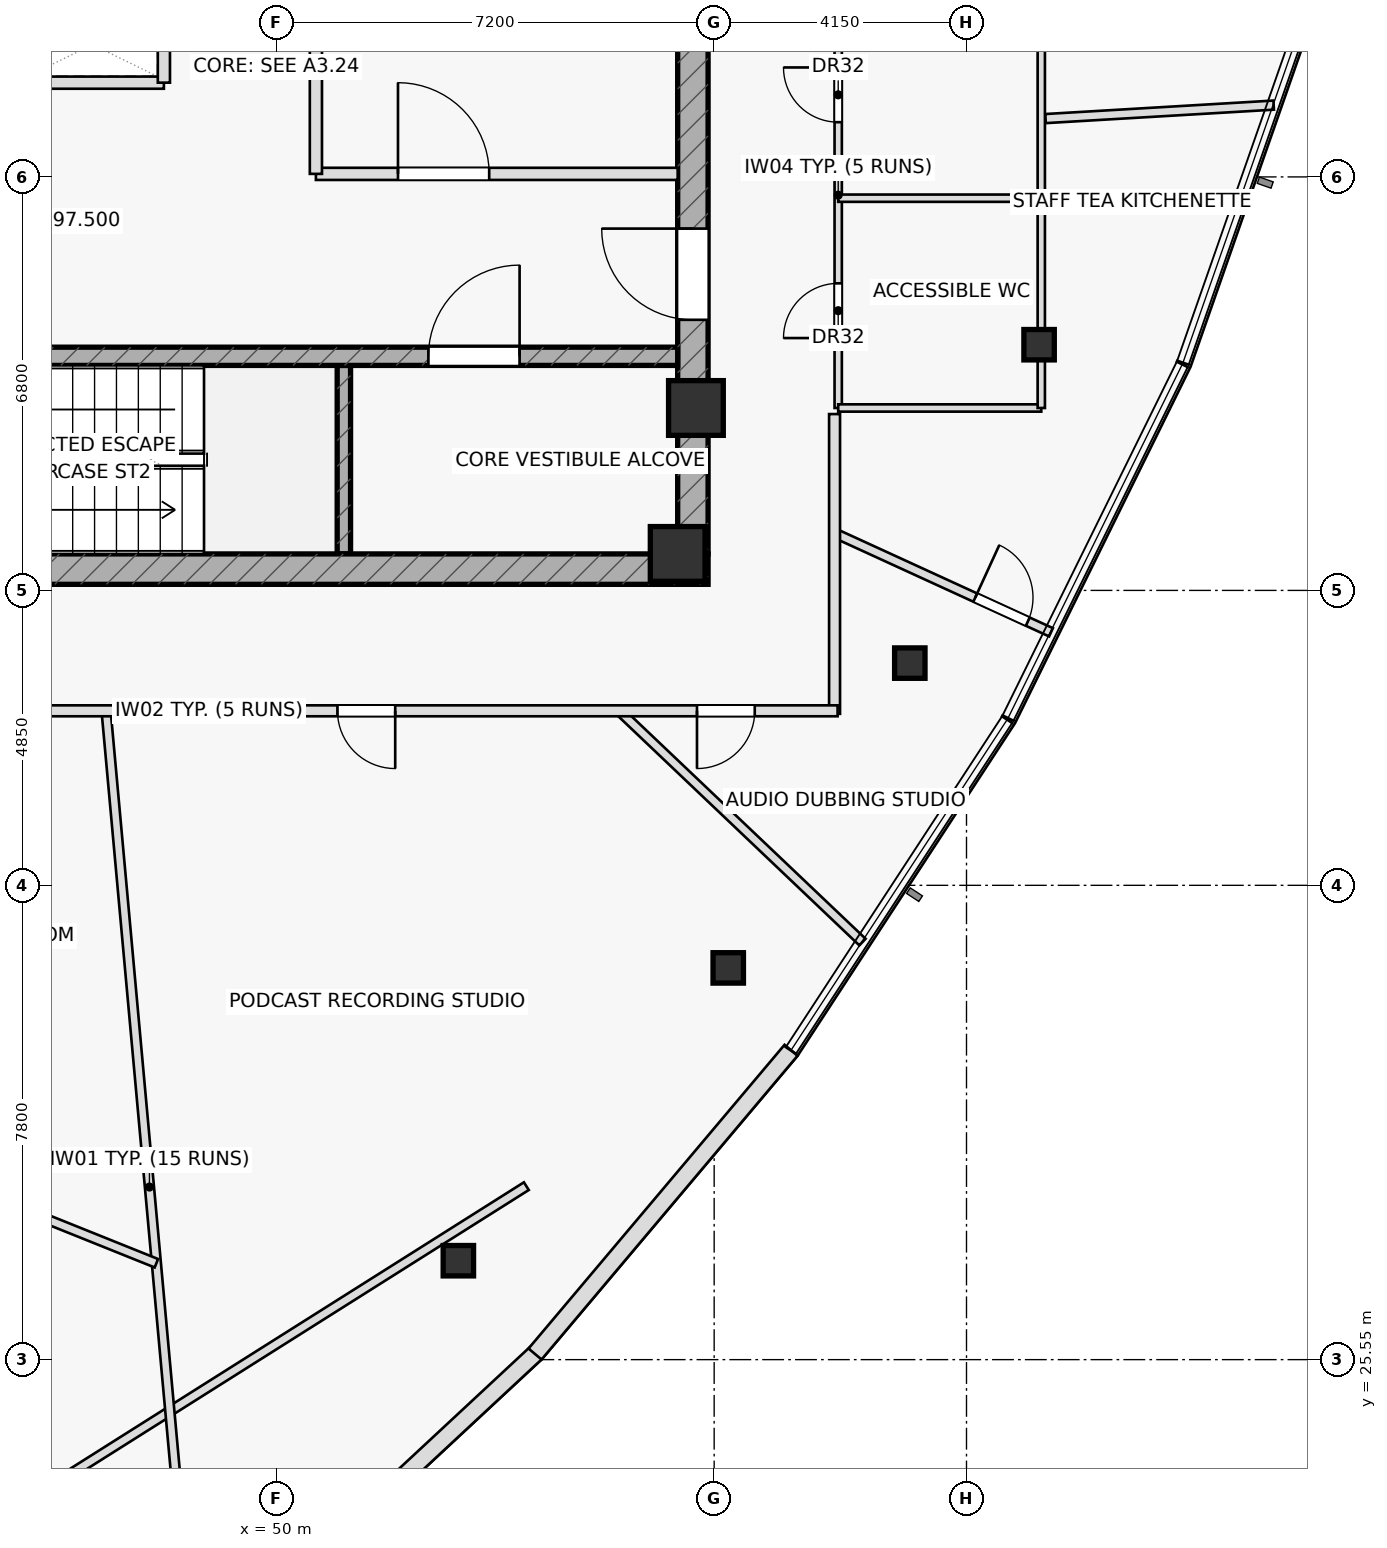
"""IFC4 building model, lengths in metres.
Left out: names, types, materials, properties, quantities, classifications, styles, units other than length and angle.
Written with IfcOpenShell. Run it as: python <this file> out.ifc"""

import sys

from ifc_helpers import new_model, si_unit, direction, frame, frame_2d, origin, origin_2d, place, context, subcontext, project, spatial, rectangle, hollow_rectangle, extrude, element, fill, save


model = new_model("IFC4")
c1 = context("Model", 3, precision=1e-05, world=origin(), true_north=direction((0.0, 1.0)))
c2 = subcontext(c1, "Body", "Model", "MODEL_VIEW")
j1 = project(units=[si_unit("LENGTHUNIT", "METRE"), si_unit("PLANEANGLEUNIT", "RADIAN")], contexts=[c1])
p1 = place(None, origin())
s1 = spatial("IfcSite", under=j1, at=p1, CompositionType="ELEMENT")
p2 = place(p1, origin())
s2 = spatial("IfcBuilding", under=s1, at=p2, CompositionType="ELEMENT")
p3 = place(p2, frame((0.0, 0.0, 297.5)))
s3 = spatial("IfcBuildingStorey", under=s2, at=p3, CompositionType="ELEMENT", Elevation=297.5)
p4 = place(p3, frame((51.11, 38.8, 0.0), z_axis=(0.0, 0.0, 1.0), x_axis=(0.0, 1.0, 0.0)))
e1 = element("IfcWall", 1, at=p4, inside=s3, PredefinedType="SHEAR", context=c2, shape_type="SweptSolid", body=[
    extrude(rectangle(XDim=3.1, YDim=0.22, at=frame_2d((1.55, 0.0))), origin(), (0.0, 0.0, 1.0), 3.7),
])
p5 = place(p3, frame((42.9, 38.55, 0.0), z_axis=(0.0, 0.0, 1.0), x_axis=(1.0, 0.0, 0.0)))
e2 = element("IfcWall", 2, at=p5, inside=s3, PredefinedType="SHEAR", context=c2, shape_type="SweptSolid", body=[
    extrude(rectangle(XDim=14.2, YDim=0.5, at=frame_2d((7.1, 0.0))), origin(), (0.0, 0.0, 1.0), 3.7),
])
p6 = place(p5, frame((0.78, 0.0, 0.0)))
e3 = element("IfcOpeningElement", 3, at=p6, cuts=e2, PredefinedType="OPENING", context=c2, shape_type="SweptSolid", body=[
    extrude(rectangle(XDim=1.05, YDim=2.2, at=frame_2d((0.525, 1.1))), frame((0.0, 0.26, 0.0), z_axis=(0.0, -1.0, 0.0), x_axis=(1.0, 0.0, 0.0)), (0.0, 0.0, 1.0), 0.52),
])
p7 = place(p3, frame((56.85, 38.8, 0.0), z_axis=(0.0, 0.0, 1.0), x_axis=(0.0, 1.0, 0.0)))
e4 = element("IfcWall", 4, at=p7, inside=s3, PredefinedType="SHEAR", context=c2, shape_type="SweptSolid", body=[
    extrude(rectangle(XDim=12.4, YDim=0.5, at=frame_2d((6.2, 0.0))), origin(), (0.0, 0.0, 1.0), 3.7),
])
p8 = place(p7, frame((3.85, 0.0, 0.0)))
e5 = element("IfcOpeningElement", 5, at=p8, cuts=e4, PredefinedType="OPENING", context=c2, shape_type="SweptSolid", body=[
    extrude(rectangle(XDim=1.5, YDim=2.2, at=frame_2d((0.75, 1.1))), frame((0.0, 0.26, 0.0), z_axis=(0.0, -1.0, 0.0), x_axis=(1.0, 0.0, 0.0)), (0.0, 0.0, 1.0), 0.52),
])
p9 = place(p3, frame((43.4, 42.05, 0.0), z_axis=(0.0, 0.0, 1.0), x_axis=(1.0, 0.0, 0.0)))
e6 = element("IfcWall", 6, at=p9, inside=s3, PredefinedType="SHEAR", context=c2, shape_type="SweptSolid", body=[
    extrude(rectangle(XDim=13.2, YDim=0.3, at=frame_2d((6.6, 0.0))), origin(), (0.0, 0.0, 1.0), 3.7),
])
p10 = place(p9, frame((9.1, 0.0, 0.0)))
e7 = element("IfcOpeningElement", 7, at=p10, cuts=e6, PredefinedType="OPENING", context=c2, shape_type="SweptSolid", body=[
    extrude(rectangle(XDim=1.5, YDim=2.2, at=frame_2d((0.75, 1.1))), frame((0.0, 0.16, 0.0), z_axis=(0.0, -1.0, 0.0), x_axis=(1.0, 0.0, 0.0)), (0.0, 0.0, 1.0), 0.32),
])
for number, where, z_axis, x_axis in (
    (8, (56.9, 41.2, 0.0), (0.0, 0.0, 1.0), (1.0, 0.0, 0.0)),
    (9, (56.6, 38.8, 0.0), (0.0, 0.0, 1.0), (1.0, 0.0, 0.0)),
):
    element("IfcColumn", number, at=place(p3, frame(where, z_axis=z_axis, x_axis=x_axis)), inside=s3, PredefinedType="COLUMN", context=c2, shape_type="SweptSolid", body=[
        extrude(rectangle(XDim=0.9, YDim=0.9, at=origin_2d()), origin(), (0.0, 0.0, 1.0), 3.7),
    ])
for number, where, z_axis, x_axis in (
    (10, (52.993, 27.177, 0.0), (0.0, 0.0, 1.0), (1.0, 0.0, 0.0)),
    (11, (57.431, 31.992, 0.0), (0.0, 0.0, 1.0), (1.0, 0.0, 0.0)),
    (12, (60.417, 37.004, 0.0), (0.0, 0.0, 1.0), (1.0, 0.0, 0.0)),
    (13, (62.544, 42.24, 0.0), (0.0, 0.0, 1.0), (1.0, 0.0, 0.0)),
):
    element("IfcColumn", number, at=place(p3, frame(where, z_axis=z_axis, x_axis=x_axis)), inside=s3, PredefinedType="COLUMN", context=c2, shape_type="SweptSolid", body=[
        extrude(hollow_rectangle(XDim=0.5, YDim=0.5, WallThickness=0.03, at=origin_2d()), origin(), (0.0, 0.0, 1.0), 3.7),
    ])
p11 = place(p3, frame((45.75, 46.55, 0.0), z_axis=(0.0, 0.0, 1.0), x_axis=(1.0, 0.0, 0.0)))
e14 = element("IfcWall", 14, at=p11, inside=s3, PredefinedType="PARTITIONING", context=c2, shape_type="SweptSolid", body=[
    extrude(rectangle(XDim=2.4, YDim=0.2, at=frame_2d((1.2, 0.0))), origin(), (0.0, 0.0, 1.0), 3.7),
])
p12 = place(p3, frame((48.15, 46.55, 0.0), z_axis=(0.0, 0.0, 1.0), x_axis=(0.0, 1.0, 0.0)))
e15 = element("IfcWall", 15, at=p12, inside=s3, PredefinedType="PARTITIONING", context=c2, shape_type="SweptSolid", body=[
    extrude(rectangle(XDim=1.25, YDim=0.2, at=frame_2d((0.625, 0.0))), origin(), (0.0, 0.0, 1.0), 3.7),
])
p13 = place(p3, frame((50.65, 45.05, 0.0), z_axis=(0.0, 0.0, 1.0), x_axis=(1.0, 0.0, 0.0)))
e16 = element("IfcWall", 16, at=p13, inside=s3, PredefinedType="PARTITIONING", context=c2, shape_type="SweptSolid", body=[
    extrude(rectangle(XDim=5.95, YDim=0.2, at=frame_2d((2.975, 0.0))), origin(), (0.0, 0.0, 1.0), 3.7),
])
p14 = place(p13, frame((1.35, 0.0, 0.0)))
e17 = element("IfcOpeningElement", 17, at=p14, cuts=e16, PredefinedType="OPENING", context=c2, shape_type="SweptSolid", body=[
    extrude(rectangle(XDim=1.5, YDim=2.2, at=frame_2d((0.75, 1.1))), frame((0.0, 0.11, 0.0), z_axis=(0.0, -1.0, 0.0), x_axis=(1.0, 0.0, 0.0)), (0.0, 0.0, 1.0), 0.22),
])
p15 = place(p3, frame((50.65, 45.05, 0.0), z_axis=(0.0, 0.0, 1.0), x_axis=(0.0, 1.0, 0.0)))
e18 = element("IfcWall", 18, at=p15, inside=s3, PredefinedType="PARTITIONING", context=c2, shape_type="SweptSolid", body=[
    extrude(rectangle(XDim=2.75, YDim=0.2, at=frame_2d((1.375, 0.0))), origin(), (0.0, 0.0, 1.0), 3.7),
])
p16 = place(p3, frame((44.927, 22.605, 0.0), z_axis=(0.0, 0.0, 1.0), x_axis=(0.845624548895, 0.533778158326, 0.0)))
e19 = element("IfcWall", 19, at=p16, inside=s3, PredefinedType="PARTITIONING", context=c2, shape_type="SweptSolid", body=[
    extrude(rectangle(XDim=10.861, YDim=0.15, at=frame_2d((5.431, 0.0))), origin(), (0.0, 0.0, 1.0), 3.175),
])
p17 = place(p3, frame((59.24, 41.2, 0.0), z_axis=(0.0, 0.0, 1.0), x_axis=(0.0, 1.0, 0.0)))
e20 = element("IfcWall", 20, at=p17, inside=s3, PredefinedType="PARTITIONING", context=c2, shape_type="SweptSolid", body=[
    extrude(rectangle(XDim=7.0, YDim=0.12, at=frame_2d((3.5, 0.0))), origin(), (0.0, 0.0, 1.0), 3.7),
])
p18 = place(p17, frame((1.15, 0.0, 0.0)))
e21 = element("IfcOpeningElement", 21, at=p18, cuts=e20, PredefinedType="OPENING", context=c2, shape_type="SweptSolid", body=[
    extrude(rectangle(XDim=0.9, YDim=2.05, at=frame_2d((0.45, 1.025))), frame((0.0, 0.07, 0.0), z_axis=(0.0, -1.0, 0.0), x_axis=(1.0, 0.0, 0.0)), (0.0, 0.0, 1.0), 0.14),
])
p19 = place(p17, frame((4.7, 0.0, 0.0)))
e22 = element("IfcOpeningElement", 22, at=p19, cuts=e20, PredefinedType="OPENING", context=c2, shape_type="SweptSolid", body=[
    extrude(rectangle(XDim=0.9, YDim=2.05, at=frame_2d((0.45, 1.025))), frame((0.0, 0.07, 0.0), z_axis=(0.0, -1.0, 0.0), x_axis=(1.0, 0.0, 0.0)), (0.0, 0.0, 1.0), 0.14),
])
p20 = place(p3, frame((59.24, 41.2, 0.0), z_axis=(0.0, 0.0, 1.0), x_axis=(1.0, 0.0, 0.0)))
e23 = element("IfcWall", 23, at=p20, inside=s3, PredefinedType="PARTITIONING", context=c2, shape_type="SweptSolid", body=[
    extrude(rectangle(XDim=3.34, YDim=0.12, at=frame_2d((1.67, 0.0))), origin(), (0.0, 0.0, 1.0), 3.175),
])
p21 = place(p3, frame((59.24, 44.65, 0.0), z_axis=(0.0, 0.0, 1.0), x_axis=(1.0, 0.0, 0.0)))
e24 = element("IfcWall", 24, at=p21, inside=s3, PredefinedType="PARTITIONING", context=c2, shape_type="SweptSolid", body=[
    extrude(rectangle(XDim=3.34, YDim=0.12, at=frame_2d((1.67, 0.0))), origin(), (0.0, 0.0, 1.0), 3.7),
])
p22 = place(p3, frame((62.58, 41.2, 0.0), z_axis=(0.0, 0.0, 1.0), x_axis=(0.0, 1.0, 0.0)))
e25 = element("IfcWall", 25, at=p22, inside=s3, PredefinedType="PARTITIONING", context=c2, shape_type="SweptSolid", body=[
    extrude(rectangle(XDim=7.0, YDim=0.12, at=frame_2d((3.5, 0.0))), origin(), (0.0, 0.0, 1.0), 3.235),
])
p23 = place(p3, frame((47.199, 36.22, 0.0), z_axis=(0.0, 0.0, 1.0), x_axis=(0.090664502259, -0.995881492965, 0.0)))
e26 = element("IfcWall", 26, at=p23, inside=s3, PredefinedType="PARTITIONING", context=c2, shape_type="SweptSolid", body=[
    extrude(rectangle(XDim=15.729, YDim=0.15, at=frame_2d((7.864, 0.0))), origin(), (0.0, 0.0, 1.0), 3.235),
])
p24 = place(p3, frame((55.638, 36.22, 0.0), z_axis=(0.0, 0.0, 1.0), x_axis=(0.724833790001, -0.688923781613, 0.0)))
e27 = element("IfcWall", 27, at=p24, inside=s3, PredefinedType="PARTITIONING", context=c2, shape_type="SweptSolid", body=[
    extrude(rectangle(XDim=5.521, YDim=0.15, at=frame_2d((2.76, 0.0))), origin(), (0.0, 0.0, 1.0), 3.175),
])
p25 = place(p3, frame((59.18, 39.143, 0.0), z_axis=(0.0, 0.0, 1.0), x_axis=(0.909076630741, -0.416628946955, 0.0)))
e28 = element("IfcWall", 28, at=p25, inside=s3, PredefinedType="PARTITIONING", context=c2, shape_type="SweptSolid", body=[
    extrude(rectangle(XDim=3.916, YDim=0.15, at=frame_2d((1.958, 0.0))), origin(), (0.0, 0.0, 1.0), 3.235),
])
p26 = place(p25, frame((2.545, 0.0, 0.0)))
e29 = element("IfcOpeningElement", 29, at=p26, cuts=e28, PredefinedType="OPENING", context=c2, shape_type="SweptSolid", body=[
    extrude(rectangle(XDim=0.95, YDim=2.05, at=frame_2d((0.475, 1.025))), frame((0.0, 0.085, 0.0), z_axis=(0.0, -1.0, 0.0), x_axis=(1.0, 0.0, 0.0)), (0.0, 0.0, 1.0), 0.17),
])
p27 = place(p3, frame((62.65, 45.959, 0.0), z_axis=(0.0, 0.0, 1.0), x_axis=(0.998263156223, 0.058912400462, 0.0)))
e30 = element("IfcWall", 30, at=p27, inside=s3, PredefinedType="PARTITIONING", context=c2, shape_type="SweptSolid", body=[
    extrude(rectangle(XDim=3.759, YDim=0.15, at=frame_2d((1.879, 0.0))), origin(), (0.0, 0.0, 1.0), 3.235),
])
p28 = place(p3, frame((36.877, 31.613, 0.0), z_axis=(0.0, 0.0, 1.0), x_axis=(0.92795166299, -0.372700565003, 0.0)))
e31 = element("IfcWall", 31, at=p28, inside=s3, PredefinedType="PARTITIONING", context=c2, shape_type="SweptSolid", body=[
    extrude(rectangle(XDim=12.015, YDim=0.15, at=frame_2d((6.008, 0.0))), origin(), (0.0, 0.0, 1.0), 3.235),
])
p29 = place(p28, frame((5.532, 0.0, 0.0)))
e32 = element("IfcOpeningElement", 32, at=p29, cuts=e31, PredefinedType="OPENING", context=c2, shape_type="SweptSolid", body=[
    extrude(rectangle(XDim=0.95, YDim=2.05, at=frame_2d((0.475, 1.025))), frame((0.0, 0.085, 0.0), z_axis=(0.0, -1.0, 0.0), x_axis=(1.0, 0.0, 0.0)), (0.0, 0.0, 1.0), 0.17),
])
p30 = place(p3, frame((59.18, 41.1, 0.0), z_axis=(0.0, 0.0, 1.0), x_axis=(0.0, -1.0, 0.0)))
e33 = element("IfcWall", 33, at=p30, inside=s3, PredefinedType="PARTITIONING", context=c2, shape_type="SweptSolid", body=[
    extrude(rectangle(XDim=4.93, YDim=0.18, at=frame_2d((2.465, 0.0))), origin(), (0.0, 0.0, 1.0), 3.435),
])
p31 = place(p3, frame((59.23, 36.22, 0.0), z_axis=(0.0, 0.0, 1.0), x_axis=(-1.0, 0.0, 0.0)))
e34 = element("IfcWall", 34, at=p31, inside=s3, PredefinedType="PARTITIONING", context=c2, shape_type="SweptSolid", body=[
    extrude(rectangle(XDim=19.48, YDim=0.18, at=frame_2d((9.74, 0.0))), origin(), (0.0, 0.0, 1.0), 3.175),
])
p32 = place(p31, frame((1.362, 0.0, 0.0)))
e35 = element("IfcOpeningElement", 35, at=p32, cuts=e34, PredefinedType="OPENING", context=c2, shape_type="SweptSolid", body=[
    extrude(rectangle(XDim=0.95, YDim=2.05, at=frame_2d((0.475, 1.025))), frame((0.0, 0.1, 0.0), z_axis=(0.0, -1.0, 0.0), x_axis=(1.0, 0.0, 0.0)), (0.0, 0.0, 1.0), 0.2),
])
p33 = place(p31, frame((7.276, 0.0, 0.0)))
e36 = element("IfcOpeningElement", 36, at=p33, cuts=e34, PredefinedType="OPENING", context=c2, shape_type="SweptSolid", body=[
    extrude(rectangle(XDim=0.95, YDim=2.05, at=frame_2d((0.475, 1.025))), frame((0.0, 0.1, 0.0), z_axis=(0.0, -1.0, 0.0), x_axis=(1.0, 0.0, 0.0)), (0.0, 0.0, 1.0), 0.2),
])
p34 = place(p31, frame((15.107, 0.0, 0.0)))
e37 = element("IfcOpeningElement", 37, at=p34, cuts=e34, PredefinedType="OPENING", context=c2, shape_type="SweptSolid", body=[
    extrude(rectangle(XDim=0.95, YDim=2.05, at=frame_2d((0.475, 1.025))), frame((0.0, 0.1, 0.0), z_axis=(0.0, -1.0, 0.0), x_axis=(1.0, 0.0, 0.0)), (0.0, 0.0, 1.0), 0.2),
])
p35 = place(p3, frame((49.482, 21.206, 0.0), z_axis=(0.0, 0.0, 1.0), x_axis=(0.732249894204, 0.68103604342, 0.0)))
e38 = element("IfcWall", 38, at=p35, inside=s3, PredefinedType="STANDARD", context=c2, shape_type="SweptSolid", body=[
    extrude(rectangle(XDim=6.545, YDim=0.28, at=frame_2d((3.272, 0.0))), origin(), (0.0, 0.0, 1.0), 3.7),
])
p36 = place(p3, frame((54.254, 25.642, 0.0), z_axis=(0.0, 0.0, 1.0), x_axis=(0.644478610534, 0.764622338521, 0.0)))
e39 = element("IfcWall", 39, at=p36, inside=s3, PredefinedType="STANDARD", context=c2, shape_type="SweptSolid", body=[
    extrude(rectangle(XDim=6.533, YDim=0.28, at=frame_2d((3.267, 0.0))), origin(), (0.0, 0.0, 1.0), 3.7),
])
p37 = place(p8, origin())
e40 = element("IfcDoor", 40, at=p37, inside=s3, OperationType="SINGLE_SWING_RIGHT", PredefinedType="DOOR", context=c2, shape_type="SweptSolid", body=[
    extrude(rectangle(XDim=1.5, YDim=2.2, at=frame_2d((0.75, 1.1))), frame((0.0, 0.025, 0.0), z_axis=(0.0, -1.0, 0.0), x_axis=(1.0, 0.0, 0.0)), (0.0, 0.0, 1.0), 0.05),
])
fill(e5, e40)
p38 = place(p14, origin())
e41 = element("IfcDoor", 41, at=p38, inside=s3, OperationType="SINGLE_SWING_LEFT", PredefinedType="DOOR", context=c2, shape_type="SweptSolid", body=[
    extrude(rectangle(XDim=1.5, YDim=2.2, at=frame_2d((0.75, 1.1))), frame((0.0, 0.025, 0.0), z_axis=(0.0, -1.0, 0.0), x_axis=(1.0, 0.0, 0.0)), (0.0, 0.0, 1.0), 0.05),
])
fill(e17, e41)
p39 = place(p10, origin())
e42 = element("IfcDoor", 42, at=p39, inside=s3, OperationType="SINGLE_SWING_RIGHT", PredefinedType="DOOR", context=c2, shape_type="SweptSolid", body=[
    extrude(rectangle(XDim=1.5, YDim=2.2, at=frame_2d((0.75, 1.1))), frame((0.0, 0.025, 0.0), z_axis=(0.0, -1.0, 0.0), x_axis=(1.0, 0.0, 0.0)), (0.0, 0.0, 1.0), 0.05),
])
fill(e7, e42)
p40 = place(p18, origin())
e43 = element("IfcDoor", 43, at=p40, inside=s3, OperationType="SINGLE_SWING_LEFT", PredefinedType="DOOR", context=c2, shape_type="SweptSolid", body=[
    extrude(rectangle(XDim=0.9, YDim=2.05, at=frame_2d((0.45, 1.025))), frame((0.0, 0.025, 0.0), z_axis=(0.0, -1.0, 0.0), x_axis=(1.0, 0.0, 0.0)), (0.0, 0.0, 1.0), 0.05),
])
fill(e21, e43)
p41 = place(p19, origin())
e44 = element("IfcDoor", 44, at=p41, inside=s3, OperationType="SINGLE_SWING_RIGHT", PredefinedType="DOOR", context=c2, shape_type="SweptSolid", body=[
    extrude(rectangle(XDim=0.9, YDim=2.05, at=frame_2d((0.45, 1.025))), frame((0.0, 0.025, 0.0), z_axis=(0.0, -1.0, 0.0), x_axis=(1.0, 0.0, 0.0)), (0.0, 0.0, 1.0), 0.05),
])
fill(e22, e44)
p42 = place(p26, origin())
e45 = element("IfcDoor", 45, at=p42, inside=s3, OperationType="SINGLE_SWING_LEFT", PredefinedType="DOOR", context=c2, shape_type="SweptSolid", body=[
    extrude(rectangle(XDim=0.95, YDim=2.05, at=frame_2d((0.475, 1.025))), frame((0.0, 0.025, 0.0), z_axis=(0.0, -1.0, 0.0), x_axis=(1.0, 0.0, 0.0)), (0.0, 0.0, 1.0), 0.05),
])
fill(e29, e45)
p43 = place(p32, origin())
e46 = element("IfcDoor", 46, at=p43, inside=s3, OperationType="SINGLE_SWING_RIGHT", PredefinedType="DOOR", context=c2, shape_type="SweptSolid", body=[
    extrude(rectangle(XDim=0.95, YDim=2.05, at=frame_2d((0.475, 1.025))), frame((0.0, 0.025, 0.0), z_axis=(0.0, -1.0, 0.0), x_axis=(1.0, 0.0, 0.0)), (0.0, 0.0, 1.0), 0.05),
])
fill(e35, e46)
p44 = place(p33, origin())
e47 = element("IfcDoor", 47, at=p44, inside=s3, OperationType="SINGLE_SWING_LEFT", PredefinedType="DOOR", context=c2, shape_type="SweptSolid", body=[
    extrude(rectangle(XDim=0.95, YDim=2.05, at=frame_2d((0.475, 1.025))), frame((0.0, 0.025, 0.0), z_axis=(0.0, -1.0, 0.0), x_axis=(1.0, 0.0, 0.0)), (0.0, 0.0, 1.0), 0.05),
])
fill(e36, e47)
save(model, sys.argv[1])
